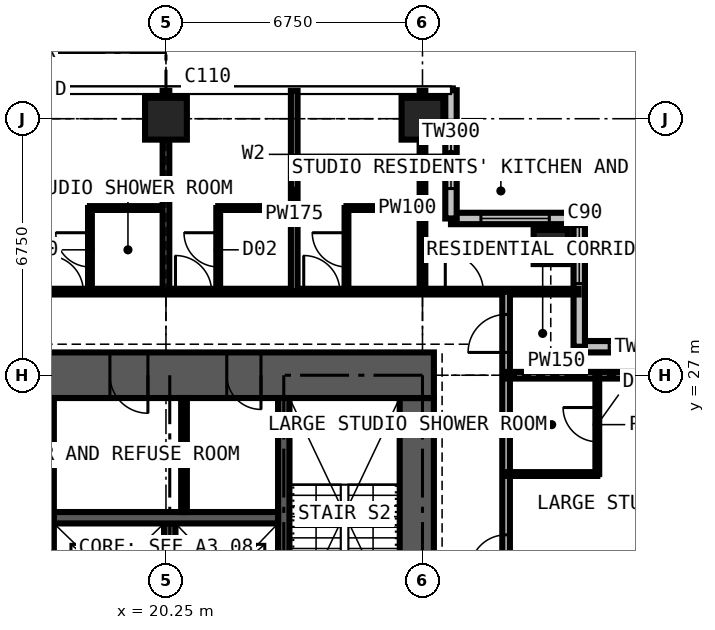
"""IFC4 building model, lengths in metres.
Left out: names, types, materials, properties, quantities, classifications, styles, units other than length and angle.
Written with IfcOpenShell. Run it as: python <this file> out.ifc"""

import sys

from ifc_helpers import new_model, si_unit, direction, frame, frame_2d, origin, origin_2d, place, context, subcontext, project, spatial, rectangle, extrude, element, fill, save


model = new_model("IFC4")
c1 = context("Model", 3, precision=1e-05, world=origin(), true_north=direction((0.0, 1.0)))
c2 = subcontext(c1, "Body", "Model", "MODEL_VIEW")
j1 = project(units=[si_unit("LENGTHUNIT", "METRE"), si_unit("PLANEANGLEUNIT", "RADIAN")], contexts=[c1])
p1 = place(None, origin())
s1 = spatial("IfcSite", under=j1, at=p1, CompositionType="ELEMENT")
p2 = place(p1, origin())
s2 = spatial("IfcBuilding", under=s1, at=p2, CompositionType="ELEMENT")
p3 = place(p2, frame((0.0, 0.0, 222.3)))
s3 = spatial("IfcBuildingStorey", under=s2, at=p3, CompositionType="ELEMENT", Elevation=222.3)
for number, where, z_axis, x_axis in (
    (1, (20.25, 33.75, 0.0), (0.0, 0.0, 1.0), (1.0, 0.0, 0.0)),
    (2, (27.0, 33.75, 0.0), (0.0, 0.0, 1.0), (1.0, 0.0, 0.0)),
):
    element("IfcColumn", number, at=place(p3, frame(where, z_axis=z_axis, x_axis=x_axis)), inside=s3, PredefinedType="COLUMN", context=c2, shape_type="SweptSolid", body=[
        extrude(rectangle(XDim=1.1, YDim=1.1, at=origin_2d()), origin(), (0.0, 0.0, 1.0), 3.6),
    ])
p4 = place(p3, frame((30.375, 30.375, 0.0), z_axis=(0.0, 0.0, 1.0), x_axis=(1.0, 0.0, 0.0)))
e3 = element("IfcColumn", 3, at=p4, inside=s3, PredefinedType="COLUMN", context=c2, shape_type="SweptSolid", body=[
    extrude(rectangle(XDim=0.9, YDim=0.9, at=origin_2d()), origin(), (0.0, 0.0, 1.0), 3.6),
])
p5 = place(p3, frame((26.85, 14.1, 0.0), z_axis=(0.0, 0.0, 1.0), x_axis=(0.0, 1.0, 0.0)))
e4 = element("IfcWall", 4, at=p5, inside=s3, PredefinedType="SHEAR", context=c2, shape_type="SweptSolid", body=[
    extrude(rectangle(XDim=12.3, YDim=0.9, at=frame_2d((6.15, 0.0))), origin(), (0.0, 0.0, 1.0), 3.6),
])
p6 = place(p5, frame((3.65, 0.0, 0.0)))
e5 = element("IfcOpeningElement", 5, at=p6, cuts=e4, PredefinedType="OPENING", context=c2, shape_type="SweptSolid", body=[
    extrude(rectangle(XDim=1.2, YDim=2.2, at=frame_2d((0.6, 1.1))), frame((0.0, 0.46, 0.0), z_axis=(0.0, -1.0, 0.0), x_axis=(1.0, 0.0, 0.0)), (0.0, 0.0, 1.0), 0.92),
])
p7 = place(p3, frame((27.3, 27.0, 0.0), z_axis=(0.0, 0.0, 1.0), x_axis=(-1.0, 0.0, 0.0)))
e6 = element("IfcWall", 6, at=p7, inside=s3, PredefinedType="SHEAR", context=c2, shape_type="SweptSolid", body=[
    extrude(rectangle(XDim=14.1, YDim=1.2, at=frame_2d((7.05, 0.0))), origin(), (0.0, 0.0, 1.0), 3.6),
])
p8 = place(p7, frame((4.55, 0.0, 0.0)))
e7 = element("IfcOpeningElement", 7, at=p8, cuts=e6, PredefinedType="OPENING", context=c2, shape_type="SweptSolid", body=[
    extrude(rectangle(XDim=0.9, YDim=2.2, at=frame_2d((0.45, 1.1))), frame((0.0, 0.61, 0.0), z_axis=(0.0, -1.0, 0.0), x_axis=(1.0, 0.0, 0.0)), (0.0, 0.0, 1.0), 1.22),
])
p9 = place(p7, frame((7.525, 0.0, 0.0)))
e8 = element("IfcOpeningElement", 8, at=p9, cuts=e6, PredefinedType="OPENING", context=c2, shape_type="SweptSolid", body=[
    extrude(rectangle(XDim=1.0, YDim=2.2, at=frame_2d((0.5, 1.1))), frame((0.0, 0.61, 0.0), z_axis=(0.0, -1.0, 0.0), x_axis=(1.0, 0.0, 0.0)), (0.0, 0.0, 1.0), 1.22),
])
p10 = place(p3, frame((34.5, 27.75, 0.0), z_axis=(0.0, 0.0, 1.0), x_axis=(-1.0, 0.0, 0.0)))
e9 = element("IfcWall", 9, at=p10, inside=s3, PredefinedType="SOLIDWALL", context=c2, shape_type="SweptSolid", body=[
    extrude(rectangle(XDim=3.375, YDim=0.3, at=frame_2d((1.688, 0.0))), origin(), (0.0, 0.0, 1.0), 3.375),
])
p11 = place(p10, frame((0.788, 0.0, 0.6)))
e10 = element("IfcOpeningElement", 10, at=p11, cuts=e9, PredefinedType="OPENING", context=c2, shape_type="SweptSolid", body=[
    extrude(rectangle(XDim=1.8, YDim=2.1, at=frame_2d((0.9, 1.05))), frame((0.0, 0.16, 0.0), z_axis=(0.0, -1.0, 0.0), x_axis=(1.0, 0.0, 0.0)), (0.0, 0.0, 1.0), 0.32),
])
p12 = place(p3, frame((31.125, 27.75, 0.0), z_axis=(0.0, 0.0, 1.0), x_axis=(0.0, 1.0, 0.0)))
e11 = element("IfcWall", 11, at=p12, inside=s3, PredefinedType="SOLIDWALL", context=c2, shape_type="SweptSolid", body=[
    extrude(rectangle(XDim=3.375, YDim=0.3, at=frame_2d((1.688, 0.0))), origin(), (0.0, 0.0, 1.0), 3.375),
])
p13 = place(p12, frame((1.663, 0.0, 0.9)))
e12 = element("IfcOpeningElement", 12, at=p13, cuts=e11, PredefinedType="OPENING", context=c2, shape_type="SweptSolid", body=[
    extrude(rectangle(XDim=1.5, YDim=1.8, at=frame_2d((0.75, 0.9))), frame((0.0, 0.16, 0.0), z_axis=(0.0, -1.0, 0.0), x_axis=(1.0, 0.0, 0.0)), (0.0, 0.0, 1.0), 0.32),
])
p14 = place(p3, frame((31.125, 31.125, 0.0), z_axis=(0.0, 0.0, 1.0), x_axis=(-1.0, 0.0, 0.0)))
e13 = element("IfcWall", 13, at=p14, inside=s3, PredefinedType="SOLIDWALL", context=c2, shape_type="SweptSolid", body=[
    extrude(rectangle(XDim=3.375, YDim=0.3, at=frame_2d((1.688, 0.0))), origin(), (0.0, 0.0, 1.0), 3.375),
])
p15 = place(p14, frame((0.788, 0.0, 0.6)))
e14 = element("IfcOpeningElement", 14, at=p15, cuts=e13, PredefinedType="OPENING", context=c2, shape_type="SweptSolid", body=[
    extrude(rectangle(XDim=1.8, YDim=2.1, at=frame_2d((0.9, 1.05))), frame((0.0, 0.16, 0.0), z_axis=(0.0, -1.0, 0.0), x_axis=(1.0, 0.0, 0.0)), (0.0, 0.0, 1.0), 0.32),
])
p16 = place(p3, frame((27.75, 31.125, 0.0), z_axis=(0.0, 0.0, 1.0), x_axis=(0.0, 1.0, 0.0)))
e15 = element("IfcWall", 15, at=p16, inside=s3, PredefinedType="SOLIDWALL", context=c2, shape_type="SweptSolid", body=[
    extrude(rectangle(XDim=3.375, YDim=0.3, at=frame_2d((1.688, 0.0))), origin(), (0.0, 0.0, 1.0), 3.375),
])
p17 = place(p16, frame((0.788, 0.0, 0.6)))
e16 = element("IfcOpeningElement", 16, at=p17, cuts=e15, PredefinedType="OPENING", context=c2, shape_type="SweptSolid", body=[
    extrude(rectangle(XDim=1.8, YDim=2.1, at=frame_2d((0.9, 1.05))), frame((0.0, 0.16, 0.0), z_axis=(0.0, -1.0, 0.0), x_axis=(1.0, 0.0, 0.0)), (0.0, 0.0, 1.0), 0.32),
])
for number, where, z_axis, x_axis in (
    (17, (17.15, 20.3, 0.0), (0.0, 0.0, 1.0), (0.0, 1.0, 0.0)),
    (18, (23.35, 20.3, 0.0), (0.0, 0.0, 1.0), (0.0, 1.0, 0.0)),
):
    element("IfcWall", number, at=place(p3, frame(where, z_axis=z_axis, x_axis=x_axis)), inside=s3, PredefinedType="SHEAR", context=c2, shape_type="SweptSolid", body=[
        extrude(rectangle(XDim=6.1, YDim=0.3, at=frame_2d((3.05, 0.0))), origin(), (0.0, 0.0, 1.0), 3.6),
    ])
p18 = place(p3, frame((20.35, 20.3, 0.0), z_axis=(0.0, 0.0, 1.0), x_axis=(0.0, 1.0, 0.0)))
e19 = element("IfcWall", 19, at=p18, inside=s3, PredefinedType="SHEAR", context=c2, shape_type="SweptSolid", body=[
    extrude(rectangle(XDim=2.8, YDim=0.3, at=frame_2d((1.4, 0.0))), origin(), (0.0, 0.0, 1.0), 3.6),
])
p19 = place(p3, frame((17.3, 23.25, 0.0), z_axis=(0.0, 0.0, 1.0), x_axis=(1.0, 0.0, 0.0)))
e20 = element("IfcWall", 20, at=p19, inside=s3, PredefinedType="SHEAR", context=c2, shape_type="SweptSolid", body=[
    extrude(rectangle(XDim=5.9, YDim=0.3, at=frame_2d((2.95, 0.0))), origin(), (0.0, 0.0, 1.0), 3.6),
])
p20 = place(p3, frame((20.725, 23.4, 0.0), z_axis=(0.0, 0.0, 1.0), x_axis=(0.0, 1.0, 0.0)))
e21 = element("IfcWall", 21, at=p20, inside=s3, PredefinedType="PARTITIONING", context=c2, shape_type="SweptSolid", body=[
    extrude(rectangle(XDim=3.0, YDim=0.15, at=frame_2d((1.5, 0.0))), origin(), (0.0, 0.0, 1.0), 3.375),
])
p21 = place(p3, frame((11.3, 29.2, 0.0), z_axis=(0.0, 0.0, 1.0), x_axis=(1.0, 0.0, 0.0)))
e22 = element("IfcWall", 22, at=p21, inside=s3, PredefinedType="PARTITIONING", context=c2, shape_type="SweptSolid", body=[
    extrude(rectangle(XDim=19.809, YDim=0.15, at=frame_2d((9.904, 0.0))), origin(), (0.0, 0.0, 1.0), 3.375),
])
p22 = place(p21, frame((16.3, 0.0, 0.0)))
e23 = element("IfcOpeningElement", 23, at=p22, cuts=e22, PredefinedType="OPENING", context=c2, shape_type="SweptSolid", body=[
    extrude(rectangle(XDim=1.0, YDim=2.2, at=frame_2d((0.5, 1.1))), frame((0.0, 0.085, 0.0), z_axis=(0.0, -1.0, 0.0), x_axis=(1.0, 0.0, 0.0)), (0.0, 0.0, 1.0), 0.17),
])
p23 = place(p21, frame((5.825, 0.0, 0.0)))
e24 = element("IfcOpeningElement", 24, at=p23, cuts=e22, PredefinedType="OPENING", context=c2, shape_type="SweptSolid", body=[
    extrude(rectangle(XDim=0.95, YDim=2.2, at=frame_2d((0.475, 1.1))), frame((0.0, 0.085, 0.0), z_axis=(0.0, -1.0, 0.0), x_axis=(1.0, 0.0, 0.0)), (0.0, 0.0, 1.0), 0.17),
])
p24 = place(p21, frame((9.2, 0.0, 0.0)))
e25 = element("IfcOpeningElement", 25, at=p24, cuts=e22, PredefinedType="OPENING", context=c2, shape_type="SweptSolid", body=[
    extrude(rectangle(XDim=0.95, YDim=2.2, at=frame_2d((0.475, 1.1))), frame((0.0, 0.085, 0.0), z_axis=(0.0, -1.0, 0.0), x_axis=(1.0, 0.0, 0.0)), (0.0, 0.0, 1.0), 0.17),
])
p25 = place(p21, frame((12.575, 0.0, 0.0)))
e26 = element("IfcOpeningElement", 26, at=p25, cuts=e22, PredefinedType="OPENING", context=c2, shape_type="SweptSolid", body=[
    extrude(rectangle(XDim=0.95, YDim=2.2, at=frame_2d((0.475, 1.1))), frame((0.0, 0.085, 0.0), z_axis=(0.0, -1.0, 0.0), x_axis=(1.0, 0.0, 0.0)), (0.0, 0.0, 1.0), 0.17),
])
p26 = place(p21, frame((0.6, 0.0, 0.0)))
e27 = element("IfcOpeningElement", 27, at=p26, cuts=e22, PredefinedType="OPENING", context=c2, shape_type="SweptSolid", body=[
    extrude(rectangle(XDim=1.0, YDim=2.2, at=frame_2d((0.5, 1.1))), frame((0.0, 0.085, 0.0), z_axis=(0.0, -1.0, 0.0), x_axis=(1.0, 0.0, 0.0)), (0.0, 0.0, 1.0), 0.17),
])
p27 = place(p3, frame((18.25, 29.2, 0.0), z_axis=(0.0, 0.0, 1.0), x_axis=(0.0, 1.0, 0.0)))
e28 = element("IfcWall", 28, at=p27, inside=s3, PredefinedType="PARTITIONING", context=c2, shape_type="SweptSolid", body=[
    extrude(rectangle(XDim=2.2, YDim=0.1, at=frame_2d((1.1, 0.0))), origin(), (0.0, 0.0, 1.0), 3.375),
])
p28 = place(p27, frame((0.65, 0.0, 0.0)))
e29 = element("IfcOpeningElement", 29, at=p28, cuts=e28, PredefinedType="OPENING", context=c2, shape_type="SweptSolid", body=[
    extrude(rectangle(XDim=0.9, YDim=2.2, at=frame_2d((0.45, 1.1))), frame((0.0, 0.06, 0.0), z_axis=(0.0, -1.0, 0.0), x_axis=(1.0, 0.0, 0.0)), (0.0, 0.0, 1.0), 0.12),
])
p29 = place(p3, frame((18.25, 31.4, 0.0), z_axis=(0.0, 0.0, 1.0), x_axis=(1.0, 0.0, 0.0)))
e30 = element("IfcWall", 30, at=p29, inside=s3, PredefinedType="PARTITIONING", context=c2, shape_type="SweptSolid", body=[
    extrude(rectangle(XDim=2.0, YDim=0.1, at=frame_2d((1.0, 0.0))), origin(), (0.0, 0.0, 1.0), 3.375),
])
p30 = place(p3, frame((20.25, 29.2, 0.0), z_axis=(0.0, 0.0, 1.0), x_axis=(0.0, 1.0, 0.0)))
e31 = element("IfcWall", 31, at=p30, inside=s3, PredefinedType="PARTITIONING", context=c2, shape_type="SweptSolid", body=[
    extrude(rectangle(XDim=5.284, YDim=0.175, at=frame_2d((2.642, 0.0))), origin(), (0.0, 0.0, 1.0), 2.61),
])
p31 = place(p3, frame((21.625, 29.2, 0.0), z_axis=(0.0, 0.0, 1.0), x_axis=(0.0, 1.0, 0.0)))
e32 = element("IfcWall", 32, at=p31, inside=s3, PredefinedType="PARTITIONING", context=c2, shape_type="SweptSolid", body=[
    extrude(rectangle(XDim=2.2, YDim=0.1, at=frame_2d((1.1, 0.0))), origin(), (0.0, 0.0, 1.0), 3.375),
])
p32 = place(p31, frame((0.65, 0.0, 0.0)))
e33 = element("IfcOpeningElement", 33, at=p32, cuts=e32, PredefinedType="OPENING", context=c2, shape_type="SweptSolid", body=[
    extrude(rectangle(XDim=0.9, YDim=2.2, at=frame_2d((0.45, 1.1))), frame((0.0, 0.06, 0.0), z_axis=(0.0, -1.0, 0.0), x_axis=(1.0, 0.0, 0.0)), (0.0, 0.0, 1.0), 0.12),
])
p33 = place(p3, frame((21.625, 31.4, 0.0), z_axis=(0.0, 0.0, 1.0), x_axis=(1.0, 0.0, 0.0)))
e34 = element("IfcWall", 34, at=p33, inside=s3, PredefinedType="PARTITIONING", context=c2, shape_type="SweptSolid", body=[
    extrude(rectangle(XDim=2.0, YDim=0.1, at=frame_2d((1.0, 0.0))), origin(), (0.0, 0.0, 1.0), 3.375),
])
p34 = place(p3, frame((23.625, 29.2, 0.0), z_axis=(0.0, 0.0, 1.0), x_axis=(0.0, 1.0, 0.0)))
e35 = element("IfcWall", 35, at=p34, inside=s3, PredefinedType="PARTITIONING", context=c2, shape_type="SweptSolid", body=[
    extrude(rectangle(XDim=5.284, YDim=0.175, at=frame_2d((2.642, 0.0))), origin(), (0.0, 0.0, 1.0), 3.375),
])
p35 = place(p3, frame((25.0, 29.2, 0.0), z_axis=(0.0, 0.0, 1.0), x_axis=(0.0, 1.0, 0.0)))
e36 = element("IfcWall", 36, at=p35, inside=s3, PredefinedType="PARTITIONING", context=c2, shape_type="SweptSolid", body=[
    extrude(rectangle(XDim=2.2, YDim=0.1, at=frame_2d((1.1, 0.0))), origin(), (0.0, 0.0, 1.0), 3.375),
])
p36 = place(p35, frame((0.65, 0.0, 0.0)))
e37 = element("IfcOpeningElement", 37, at=p36, cuts=e36, PredefinedType="OPENING", context=c2, shape_type="SweptSolid", body=[
    extrude(rectangle(XDim=0.9, YDim=2.2, at=frame_2d((0.45, 1.1))), frame((0.0, 0.06, 0.0), z_axis=(0.0, -1.0, 0.0), x_axis=(1.0, 0.0, 0.0)), (0.0, 0.0, 1.0), 0.12),
])
p37 = place(p3, frame((25.0, 31.4, 0.0), z_axis=(0.0, 0.0, 1.0), x_axis=(1.0, 0.0, 0.0)))
e38 = element("IfcWall", 38, at=p37, inside=s3, PredefinedType="PARTITIONING", context=c2, shape_type="SweptSolid", body=[
    extrude(rectangle(XDim=2.0, YDim=0.1, at=frame_2d((1.0, 0.0))), origin(), (0.0, 0.0, 1.0), 3.375),
])
p38 = place(p3, frame((27.0, 29.2, 0.0), z_axis=(0.0, 0.0, 1.0), x_axis=(0.0, 1.0, 0.0)))
e39 = element("IfcWall", 39, at=p38, inside=s3, PredefinedType="PARTITIONING", context=c2, shape_type="SweptSolid", body=[
    extrude(rectangle(XDim=5.284, YDim=0.15, at=frame_2d((2.642, 0.0))), origin(), (0.0, 0.0, 1.0), 2.877),
])
p39 = place(p3, frame((29.2, 11.3, 0.0), z_axis=(0.0, 0.0, 1.0), x_axis=(0.0, 1.0, 0.0)))
e40 = element("IfcWall", 40, at=p39, inside=s3, PredefinedType="PARTITIONING", context=c2, shape_type="SweptSolid", body=[
    extrude(rectangle(XDim=17.9, YDim=0.2, at=frame_2d((8.95, 0.0))), origin(), (0.0, 0.0, 1.0), 3.375),
])
p40 = place(p39, frame((0.6, 0.0, 0.0)))
e41 = element("IfcOpeningElement", 41, at=p40, cuts=e40, PredefinedType="OPENING", context=c2, shape_type="SweptSolid", body=[
    extrude(rectangle(XDim=1.0, YDim=2.2, at=frame_2d((0.5, 1.1))), frame((0.0, 0.11, 0.0), z_axis=(0.0, -1.0, 0.0), x_axis=(1.0, 0.0, 0.0)), (0.0, 0.0, 1.0), 0.22),
])
p41 = place(p39, frame((10.55, 0.0, 0.0)))
e42 = element("IfcOpeningElement", 42, at=p41, cuts=e40, PredefinedType="OPENING", context=c2, shape_type="SweptSolid", body=[
    extrude(rectangle(XDim=0.95, YDim=2.2, at=frame_2d((0.475, 1.1))), frame((0.0, 0.11, 0.0), z_axis=(0.0, -1.0, 0.0), x_axis=(1.0, 0.0, 0.0)), (0.0, 0.0, 1.0), 0.22),
])
p42 = place(p39, frame((3.8, 0.0, 0.0)))
e43 = element("IfcOpeningElement", 43, at=p42, cuts=e40, PredefinedType="OPENING", context=c2, shape_type="SweptSolid", body=[
    extrude(rectangle(XDim=0.95, YDim=2.2, at=frame_2d((0.475, 1.1))), frame((0.0, 0.11, 0.0), z_axis=(0.0, -1.0, 0.0), x_axis=(1.0, 0.0, 0.0)), (0.0, 0.0, 1.0), 0.22),
])
p43 = place(p39, frame((16.3, 0.0, 0.0)))
e44 = element("IfcOpeningElement", 44, at=p43, cuts=e40, PredefinedType="OPENING", context=c2, shape_type="SweptSolid", body=[
    extrude(rectangle(XDim=1.0, YDim=2.2, at=frame_2d((0.5, 1.1))), frame((0.0, 0.11, 0.0), z_axis=(0.0, -1.0, 0.0), x_axis=(1.0, 0.0, 0.0)), (0.0, 0.0, 1.0), 0.22),
])
p44 = place(p3, frame((29.2, 24.4, 0.0), z_axis=(0.0, 0.0, 1.0), x_axis=(1.0, 0.0, 0.0)))
e45 = element("IfcWall", 45, at=p44, inside=s3, PredefinedType="PARTITIONING", context=c2, shape_type="SweptSolid", body=[
    extrude(rectangle(XDim=2.4, YDim=0.1, at=frame_2d((1.2, 0.0))), origin(), (0.0, 0.0, 1.0), 3.375),
])
p45 = place(p3, frame((29.2, 27.0, 0.0), z_axis=(0.0, 0.0, 1.0), x_axis=(1.0, 0.0, 0.0)))
e46 = element("IfcWall", 46, at=p45, inside=s3, PredefinedType="PARTITIONING", context=c2, shape_type="SweptSolid", body=[
    extrude(rectangle(XDim=5.284, YDim=0.175, at=frame_2d((2.642, 0.0))), origin(), (0.0, 0.0, 1.0), 2.877),
])
p46 = place(p3, frame((31.125, 27.0, 0.0), z_axis=(0.0, 0.0, 1.0), x_axis=(0.0, 1.0, 0.0)))
e47 = element("IfcWall", 47, at=p46, inside=s3, PredefinedType="PARTITIONING", context=c2, shape_type="SweptSolid", body=[
    extrude(rectangle(XDim=0.734, YDim=0.15, at=frame_2d((0.367, 0.0))), origin(), (0.0, 0.0, 1.0), 3.375),
])
p47 = place(p3, frame((31.6, 24.4, 0.0), z_axis=(0.0, 0.0, 1.0), x_axis=(0.0, 1.0, 0.0)))
e48 = element("IfcWall", 48, at=p47, inside=s3, PredefinedType="PARTITIONING", context=c2, shape_type="SweptSolid", body=[
    extrude(rectangle(XDim=2.6, YDim=0.1, at=frame_2d((1.3, 0.0))), origin(), (0.0, 0.0, 1.0), 3.375),
])
p48 = place(p47, frame((0.85, 0.0, 0.0)))
e49 = element("IfcOpeningElement", 49, at=p48, cuts=e48, PredefinedType="OPENING", context=c2, shape_type="SweptSolid", body=[
    extrude(rectangle(XDim=0.9, YDim=2.2, at=frame_2d((0.45, 1.1))), frame((0.0, 0.06, 0.0), z_axis=(0.0, -1.0, 0.0), x_axis=(1.0, 0.0, 0.0)), (0.0, 0.0, 1.0), 0.12),
])
p49 = place(p11, origin())
e50 = element("IfcWindow", 50, at=p49, inside=s3, PartitioningType="SINGLE_PANEL", PredefinedType="WINDOW", context=c2, shape_type="SweptSolid", body=[
    extrude(rectangle(XDim=1.8, YDim=2.1, at=frame_2d((0.9, 1.05))), frame((0.0, 0.03, 0.0), z_axis=(0.0, -1.0, 0.0), x_axis=(1.0, 0.0, 0.0)), (0.0, 0.0, 1.0), 0.06),
])
fill(e10, e50)
p50 = place(p13, origin())
e51 = element("IfcWindow", 51, at=p50, inside=s3, PartitioningType="SINGLE_PANEL", PredefinedType="WINDOW", context=c2, shape_type="SweptSolid", body=[
    extrude(rectangle(XDim=1.5, YDim=1.8, at=frame_2d((0.75, 0.9))), frame((0.0, 0.03, 0.0), z_axis=(0.0, -1.0, 0.0), x_axis=(1.0, 0.0, 0.0)), (0.0, 0.0, 1.0), 0.06),
])
fill(e12, e51)
p51 = place(p15, origin())
e52 = element("IfcWindow", 52, at=p51, inside=s3, PartitioningType="SINGLE_PANEL", PredefinedType="WINDOW", context=c2, shape_type="SweptSolid", body=[
    extrude(rectangle(XDim=1.8, YDim=2.1, at=frame_2d((0.9, 1.05))), frame((0.0, 0.03, 0.0), z_axis=(0.0, -1.0, 0.0), x_axis=(1.0, 0.0, 0.0)), (0.0, 0.0, 1.0), 0.06),
])
fill(e14, e52)
p52 = place(p17, origin())
e53 = element("IfcWindow", 53, at=p52, inside=s3, PartitioningType="SINGLE_PANEL", PredefinedType="WINDOW", context=c2, shape_type="SweptSolid", body=[
    extrude(rectangle(XDim=1.8, YDim=2.1, at=frame_2d((0.9, 1.05))), frame((0.0, 0.03, 0.0), z_axis=(0.0, -1.0, 0.0), x_axis=(1.0, 0.0, 0.0)), (0.0, 0.0, 1.0), 0.06),
])
fill(e16, e53)
p53 = place(p8, origin())
e54 = element("IfcDoor", 54, at=p53, inside=s3, OperationType="SINGLE_SWING_LEFT", PredefinedType="DOOR", context=c2, shape_type="SweptSolid", body=[
    extrude(rectangle(XDim=0.9, YDim=2.2, at=frame_2d((0.45, 1.1))), frame((0.0, 0.4, 0.0), z_axis=(0.0, -1.0, 0.0), x_axis=(1.0, 0.0, 0.0)), (0.0, 0.0, 1.0), 0.8),
])
fill(e7, e54)
p54 = place(p9, origin())
e55 = element("IfcDoor", 55, at=p54, inside=s3, OperationType="SINGLE_SWING_LEFT", PredefinedType="DOOR", context=c2, shape_type="SweptSolid", body=[
    extrude(rectangle(XDim=1.0, YDim=2.2, at=frame_2d((0.5, 1.1))), frame((0.0, 0.025, 0.0), z_axis=(0.0, -1.0, 0.0), x_axis=(1.0, 0.0, 0.0)), (0.0, 0.0, 1.0), 0.05),
])
fill(e8, e55)
p55 = place(p41, origin())
e56 = element("IfcDoor", 56, at=p55, inside=s3, OperationType="SINGLE_SWING_LEFT", PredefinedType="DOOR", context=c2, shape_type="SweptSolid", body=[
    extrude(rectangle(XDim=0.95, YDim=2.2, at=frame_2d((0.475, 1.1))), frame((0.0, 0.025, 0.0), z_axis=(0.0, -1.0, 0.0), x_axis=(1.0, 0.0, 0.0)), (0.0, 0.0, 1.0), 0.05),
])
fill(e42, e56)
p56 = place(p48, origin())
e57 = element("IfcDoor", 57, at=p56, inside=s3, OperationType="SINGLE_SWING_RIGHT", PredefinedType="DOOR", context=c2, shape_type="SweptSolid", body=[
    extrude(rectangle(XDim=0.9, YDim=2.2, at=frame_2d((0.45, 1.1))), frame((0.0, 0.025, 0.0), z_axis=(0.0, -1.0, 0.0), x_axis=(1.0, 0.0, 0.0)), (0.0, 0.0, 1.0), 0.05),
])
fill(e49, e57)
p57 = place(p43, origin())
e58 = element("IfcDoor", 58, at=p57, inside=s3, OperationType="SINGLE_SWING_LEFT", PredefinedType="DOOR", context=c2, shape_type="SweptSolid", body=[
    extrude(rectangle(XDim=1.0, YDim=2.2, at=frame_2d((0.5, 1.1))), frame((0.0, 0.025, 0.0), z_axis=(0.0, -1.0, 0.0), x_axis=(1.0, 0.0, 0.0)), (0.0, 0.0, 1.0), 0.05),
])
fill(e44, e58)
p58 = place(p22, origin())
e59 = element("IfcDoor", 59, at=p58, inside=s3, OperationType="SINGLE_SWING_LEFT", PredefinedType="DOOR", context=c2, shape_type="SweptSolid", body=[
    extrude(rectangle(XDim=1.0, YDim=2.2, at=frame_2d((0.5, 1.1))), frame((0.0, 0.025, 0.0), z_axis=(0.0, -1.0, 0.0), x_axis=(1.0, 0.0, 0.0)), (0.0, 0.0, 1.0), 0.05),
])
fill(e23, e59)
p59 = place(p23, origin())
e60 = element("IfcDoor", 60, at=p59, inside=s3, OperationType="SINGLE_SWING_LEFT", PredefinedType="DOOR", context=c2, shape_type="SweptSolid", body=[
    extrude(rectangle(XDim=0.95, YDim=2.2, at=frame_2d((0.475, 1.1))), frame((0.0, 0.025, 0.0), z_axis=(0.0, -1.0, 0.0), x_axis=(1.0, 0.0, 0.0)), (0.0, 0.0, 1.0), 0.05),
])
fill(e24, e60)
p60 = place(p28, origin())
e61 = element("IfcDoor", 61, at=p60, inside=s3, OperationType="SINGLE_SWING_RIGHT", PredefinedType="DOOR", context=c2, shape_type="SweptSolid", body=[
    extrude(rectangle(XDim=0.9, YDim=2.2, at=frame_2d((0.45, 1.1))), frame((0.0, 0.025, 0.0), z_axis=(0.0, -1.0, 0.0), x_axis=(1.0, 0.0, 0.0)), (0.0, 0.0, 1.0), 0.05),
])
fill(e29, e61)
p61 = place(p24, origin())
e62 = element("IfcDoor", 62, at=p61, inside=s3, OperationType="SINGLE_SWING_LEFT", PredefinedType="DOOR", context=c2, shape_type="SweptSolid", body=[
    extrude(rectangle(XDim=0.95, YDim=2.2, at=frame_2d((0.475, 1.1))), frame((0.0, 0.025, 0.0), z_axis=(0.0, -1.0, 0.0), x_axis=(1.0, 0.0, 0.0)), (0.0, 0.0, 1.0), 0.05),
])
fill(e25, e62)
p62 = place(p32, origin())
e63 = element("IfcDoor", 63, at=p62, inside=s3, OperationType="SINGLE_SWING_RIGHT", PredefinedType="DOOR", context=c2, shape_type="SweptSolid", body=[
    extrude(rectangle(XDim=0.9, YDim=2.2, at=frame_2d((0.45, 1.1))), frame((0.0, 0.025, 0.0), z_axis=(0.0, -1.0, 0.0), x_axis=(1.0, 0.0, 0.0)), (0.0, 0.0, 1.0), 0.05),
])
fill(e33, e63)
p63 = place(p25, origin())
e64 = element("IfcDoor", 64, at=p63, inside=s3, OperationType="SINGLE_SWING_LEFT", PredefinedType="DOOR", context=c2, shape_type="SweptSolid", body=[
    extrude(rectangle(XDim=0.95, YDim=2.2, at=frame_2d((0.475, 1.1))), frame((0.0, 0.025, 0.0), z_axis=(0.0, -1.0, 0.0), x_axis=(1.0, 0.0, 0.0)), (0.0, 0.0, 1.0), 0.05),
])
fill(e26, e64)
p64 = place(p36, origin())
e65 = element("IfcDoor", 65, at=p64, inside=s3, OperationType="SINGLE_SWING_RIGHT", PredefinedType="DOOR", context=c2, shape_type="SweptSolid", body=[
    extrude(rectangle(XDim=0.9, YDim=2.2, at=frame_2d((0.45, 1.1))), frame((0.0, 0.025, 0.0), z_axis=(0.0, -1.0, 0.0), x_axis=(1.0, 0.0, 0.0)), (0.0, 0.0, 1.0), 0.05),
])
fill(e37, e65)
save(model, sys.argv[1])
